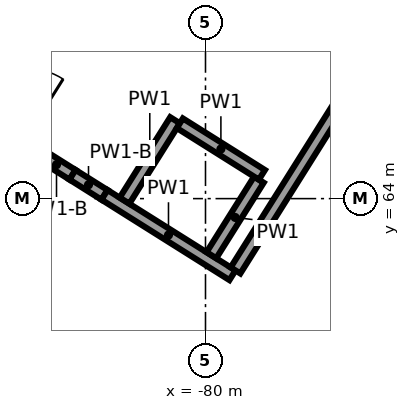
"""IFC4 building model, lengths in metres.
Left out: names, types, materials, properties, quantities, classifications, styles, units other than length and angle.
Written with IfcOpenShell. Run it as: python <this file> out.ifc"""

import sys

from ifc_helpers import new_model, si_unit, direction, frame, frame_2d, origin, origin_2d, place, context, subcontext, project, spatial, rectangle, circle, extrude, element, save


model = new_model("IFC4")
c1 = context("Model", 3, precision=1e-05, world=origin(), true_north=direction((0.0, 1.0)))
c2 = subcontext(c1, "Body", "Model", "MODEL_VIEW")
j1 = project(units=[si_unit("LENGTHUNIT", "METRE"), si_unit("PLANEANGLEUNIT", "RADIAN")], contexts=[c1])
p1 = place(None, origin())
s1 = spatial("IfcSite", under=j1, at=p1, CompositionType="ELEMENT")
p2 = place(p1, origin())
s2 = spatial("IfcBuilding", under=s1, at=p2, CompositionType="ELEMENT")
p3 = place(p2, frame((0.0, 0.0, -4.0)))
s3 = spatial("IfcBuildingStorey", under=s2, at=p3, CompositionType="ELEMENT", Elevation=-4.0)
p4 = place(p3, frame((-82.169, 63.034, -1.2), z_axis=(0.0, 0.0, 1.0), x_axis=(1.0, 0.0, 0.0)))
e1 = element("IfcColumn", 1, at=p4, inside=s3, PredefinedType="COLUMN", context=c2, shape_type="SweptSolid", body=[
    extrude(circle(Radius=0.5, at=origin_2d()), origin(), (0.0, 0.0, 1.0), 5.2),
])
for number, where, z_axis, x_axis in (
    (2, (-82.171, 64.579, 0.0), (0.0, 0.0, 1.0), (0.847, -0.532, 0.0)),
    (3, (-81.75, 64.314, 0.0), (0.0, 0.0, 1.0), (0.847, -0.532, 0.0)),
):
    element("IfcWall", number, at=place(p3, frame(where, z_axis=z_axis, x_axis=x_axis)), inside=s3, PredefinedType="PARTITIONING", context=c2, shape_type="SweptSolid", body=[
        extrude(rectangle(XDim=0.497, YDim=0.15, at=frame_2d((0.249, 0.0))), origin(), (0.0, 0.0, 1.0), 2.5),
    ])
p5 = place(p3, frame((-81.329, 64.05, 0.0), z_axis=(0.0, 0.0, 1.0), x_axis=(0.84670607735, -0.532060916229, 0.0)))
e4 = element("IfcWall", 4, at=p5, inside=s3, PredefinedType="PARTITIONING", context=c2, shape_type="SweptSolid", body=[
    extrude(rectangle(XDim=1.989, YDim=0.15, at=frame_2d((0.994, 0.0))), origin(), (0.0, 0.0, 1.0), 3.6),
])
p6 = place(p3, frame((-79.605, 63.055, 0.0), z_axis=(0.0, 0.0, 1.0), x_axis=(0.532032873767, 0.846723698281, 0.0)))
e5 = element("IfcWall", 5, at=p6, inside=s3, PredefinedType="PARTITIONING", context=c2, shape_type="SweptSolid", body=[
    extrude(rectangle(XDim=6.49, YDim=0.15, at=frame_2d((3.245, 0.0))), origin(), (0.0, 0.0, 1.0), 3.6),
])
p7 = place(p3, frame((-80.401, 65.031, 0.0), z_axis=(0.0, 0.0, 1.0), x_axis=(-0.532035438589, -0.846722086688, 0.0)))
e6 = element("IfcWall", 6, at=p7, inside=s3, PredefinedType="PARTITIONING", context=c2, shape_type="SweptSolid", body=[
    extrude(rectangle(XDim=1.249, YDim=0.15, at=frame_2d((0.625, 0.0))), origin(), (0.0, 0.0, 1.0), 3.6),
])
p8 = place(p3, frame((-79.922, 63.255, 0.0), z_axis=(0.0, 0.0, 1.0), x_axis=(0.531941549268, 0.846781074518, 0.0)))
e7 = element("IfcWall", 7, at=p8, inside=s3, PredefinedType="PARTITIONING", context=c2, shape_type="SweptSolid", body=[
    extrude(rectangle(XDim=1.174, YDim=0.15, at=frame_2d((0.587, 0.0))), origin(), (0.0, 0.0, 1.0), 3.6),
])
p9 = place(p3, frame((-79.258, 64.313, 0.0), z_axis=(0.0, 0.0, 1.0), x_axis=(-0.846769635862, 0.531959757672, 0.0)))
e8 = element("IfcWall", 8, at=p9, inside=s3, PredefinedType="PARTITIONING", context=c2, shape_type="SweptSolid", body=[
    extrude(rectangle(XDim=1.275, YDim=0.15, at=frame_2d((0.637, 0.0))), origin(), (0.0, 0.0, 1.0), 3.6),
])
p10 = place(p3, frame((-83.357, 65.59, 0.0), z_axis=(0.0, 0.0, 1.0), x_axis=(0.532007940343, 0.84673936451, 0.0)))
e9 = element("IfcWall", 9, at=p10, inside=s3, PredefinedType="PARTITIONING", context=c2, shape_type="SweptSolid", body=[
    extrude(rectangle(XDim=3.515, YDim=0.15, at=frame_2d((1.757, 0.0))), origin(), (0.0, 0.0, 1.0), 3.6),
])
p11 = place(p10, frame((0.85, 0.0, 0.0)))
e10 = element("IfcOpeningElement", 10, at=p11, cuts=e9, PredefinedType="OPENING", context=c2, shape_type="SweptSolid", body=[
    extrude(rectangle(XDim=1.8, YDim=2.1, at=frame_2d((0.9, 1.05))), frame((0.0, 0.085, 0.0), z_axis=(0.0, -1.0, 0.0), x_axis=(1.0, 0.0, 0.0)), (0.0, 0.0, 1.0), 0.17),
])
save(model, sys.argv[1])
